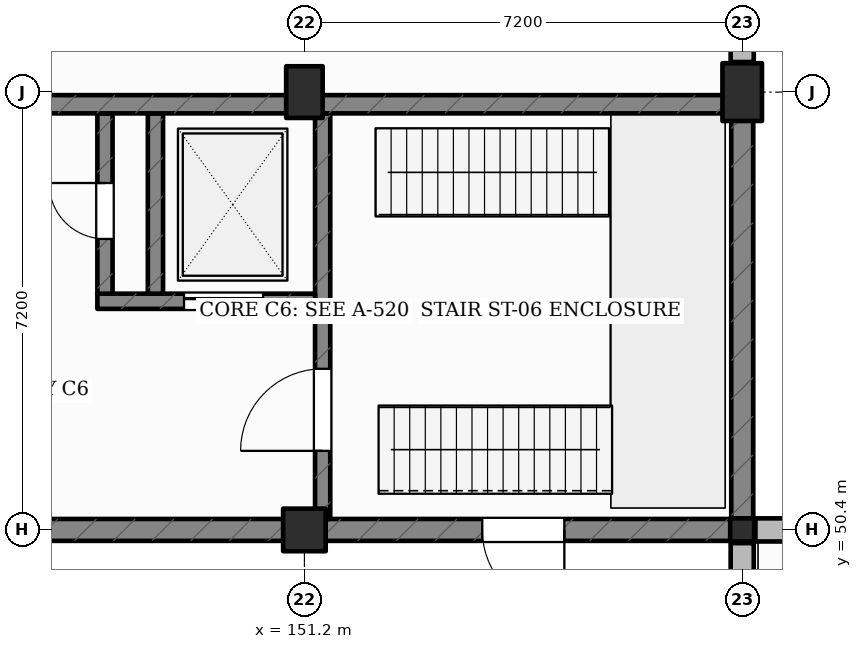
"""IFC4 building model, lengths in metres.
Left out: names, types, materials, properties, quantities, classifications, styles, units other than length and angle.
Written with IfcOpenShell. Run it as: python <this file> out.ifc"""

import sys

from ifc_helpers import new_model, si_unit, direction, frame, frame_2d, origin, origin_2d, place, context, subcontext, project, spatial, rectangle, i_section, extrude, element, fill, save


model = new_model("IFC4")
c1 = context("Model", 3, precision=1e-05, world=origin(), true_north=direction((0.0, 1.0)))
c2 = subcontext(c1, "Body", "Model", "MODEL_VIEW")
j1 = project(units=[si_unit("LENGTHUNIT", "METRE"), si_unit("PLANEANGLEUNIT", "RADIAN")], contexts=[c1])
p1 = place(None, origin())
s1 = spatial("IfcSite", under=j1, at=p1, CompositionType="ELEMENT")
p2 = place(p1, origin())
s2 = spatial("IfcBuilding", under=s1, at=p2, CompositionType="ELEMENT")
p3 = place(p2, origin())
s3 = spatial("IfcBuildingStorey", under=s2, at=p3, CompositionType="ELEMENT", Elevation=0.0)
p4 = place(p3, frame((151.2, 50.4, -0.3), z_axis=(0.0, 0.0, 1.0), x_axis=(1.0, 0.0, 0.0)))
e1 = element("IfcColumn", 1, at=p4, inside=s3, PredefinedType="COLUMN", context=c2, shape_type="SweptSolid", body=[
    extrude(rectangle(XDim=0.7, YDim=0.7, at=origin_2d()), origin(), (0.0, 0.0, 1.0), 5.7),
])
p5 = place(p3, frame((151.2, 57.6, -0.3), z_axis=(0.0, 0.0, 1.0), x_axis=(1.0, 0.0, 0.0)))
e2 = element("IfcColumn", 2, at=p5, inside=s3, PredefinedType="COLUMN", context=c2, shape_type="SweptSolid", body=[
    extrude(rectangle(XDim=0.6, YDim=0.85, at=origin_2d()), origin(), (0.0, 0.0, 1.0), 5.7),
])
p6 = place(p3, frame((158.4, 50.4, -0.3), z_axis=(0.0, 0.0, 1.0), x_axis=(1.0, 0.0, 0.0)))
e3 = element("IfcColumn", 3, at=p6, inside=s3, PredefinedType="COLUMN", context=c2, shape_type="SweptSolid", body=[
    extrude(i_section(OverallWidth=0.395, OverallDepth=0.381, WebThickness=0.018, FlangeThickness=0.03, FilletRadius=0.015, at=origin_2d()), origin(), (0.0, 0.0, 1.0), 5.7),
])
p7 = place(p3, frame((158.4, 57.6, -0.3), z_axis=(0.0, 0.0, 1.0), x_axis=(1.0, 0.0, 0.0)))
e4 = element("IfcColumn", 4, at=p7, inside=s3, PredefinedType="COLUMN", context=c2, shape_type="SweptSolid", body=[
    extrude(rectangle(XDim=0.65, YDim=0.95, at=origin_2d()), origin(), (0.0, 0.0, 1.0), 5.7),
])
p8 = place(p3, frame((158.4, 64.642, 0.0), z_axis=(0.0, 0.0, 1.0), x_axis=(0.0, -1.0, 0.0)))
e5 = element("IfcWall", 5, at=p8, inside=s3, PredefinedType="SOLIDWALL", context=c2, shape_type="SweptSolid", body=[
    extrude(rectangle(XDim=6.547, YDim=0.38, at=frame_2d((3.273, 0.0))), origin(), (0.0, 0.0, 1.0), 4.523),
])
p9 = place(p8, frame((1.423, 0.0, 0.0)))
e6 = element("IfcOpeningElement", 6, at=p9, cuts=e5, PredefinedType="OPENING", context=c2, shape_type="SweptSolid", body=[
    extrude(rectangle(XDim=3.7, YDim=4.4, at=frame_2d((1.85, 2.2))), frame((0.0, 0.2, 0.0), z_axis=(0.0, -1.0, 0.0), x_axis=(1.0, 0.0, 0.0)), (0.0, 0.0, 1.0), 0.4),
])
p10 = place(p3, frame((158.4, 57.6, 0.0), z_axis=(0.0, 0.0, 1.0), x_axis=(0.0, -1.0, 0.0)))
e7 = element("IfcWall", 7, at=p10, inside=s3, PredefinedType="SHEAR", context=c2, shape_type="SweptSolid", body=[
    extrude(rectangle(XDim=7.2, YDim=0.36, at=frame_2d((3.6, 0.0))), origin(), (0.0, 0.0, 1.0), 4.373),
])
p11 = place(p3, frame((158.4, 50.4, 0.0), z_axis=(0.0, 0.0, 1.0), x_axis=(-1.0, 0.0, 0.0)))
e8 = element("IfcWall", 8, at=p11, inside=s3, PredefinedType="SHEAR", context=c2, shape_type="SweptSolid", body=[
    extrude(rectangle(XDim=7.2, YDim=0.36, at=frame_2d((3.6, 0.0))), origin(), (0.0, 0.0, 1.0), 4.373),
])
p12 = place(p11, frame((2.925, 0.0, 0.0)))
e9 = element("IfcOpeningElement", 9, at=p12, cuts=e8, PredefinedType="OPENING", context=c2, shape_type="SweptSolid", body=[
    extrude(rectangle(XDim=1.35, YDim=2.15, at=frame_2d((0.675, 1.075))), frame((0.0, 0.19, 0.0), z_axis=(0.0, -1.0, 0.0), x_axis=(1.0, 0.0, 0.0)), (0.0, 0.0, 1.0), 0.38),
])
p13 = place(p3, frame((151.2, 50.4, 0.0), z_axis=(0.0, 0.0, 1.0), x_axis=(-1.0, 0.0, 0.0)))
e10 = element("IfcWall", 10, at=p13, inside=s3, PredefinedType="SHEAR", context=c2, shape_type="SweptSolid", body=[
    extrude(rectangle(XDim=7.2, YDim=0.36, at=frame_2d((3.6, 0.0))), origin(), (0.0, 0.0, 1.0), 4.6),
])
p14 = place(p3, frame((158.617, 50.4, 0.0), z_axis=(0.0, 0.0, 1.0), x_axis=(1.0, 0.0, 0.0)))
e11 = element("IfcWall", 11, at=p14, inside=s3, PredefinedType="SOLIDWALL", context=c2, shape_type="SweptSolid", body=[
    extrude(rectangle(XDim=6.765, YDim=0.38, at=frame_2d((3.383, 0.0))), origin(), (0.0, 0.0, 1.0), 4.373),
])
p15 = place(p3, frame((158.4, 43.417, 0.0), z_axis=(0.0, 0.0, 1.0), x_axis=(0.0, 1.0, 0.0)))
e12 = element("IfcWall", 12, at=p15, inside=s3, PredefinedType="SOLIDWALL", context=c2, shape_type="SweptSolid", body=[
    extrude(rectangle(XDim=6.765, YDim=0.38, at=frame_2d((3.383, 0.0))), origin(), (0.0, 0.0, 1.0), 4.373),
])
p16 = place(p15, frame((2.633, 0.0, 0.0)))
e13 = element("IfcOpeningElement", 13, at=p16, cuts=e12, PredefinedType="OPENING", context=c2, shape_type="SweptSolid", body=[
    extrude(rectangle(XDim=1.5, YDim=2.15, at=frame_2d((0.75, 1.075))), frame((0.0, 0.2, 0.0), z_axis=(0.0, -1.0, 0.0), x_axis=(1.0, 0.0, 0.0)), (0.0, 0.0, 1.0), 0.4),
])
p17 = place(p3, frame((151.5, 50.58, 0.0), z_axis=(0.0, 0.0, 1.0), x_axis=(0.0, 1.0, 0.0)))
e14 = element("IfcWall", 14, at=p17, inside=s3, PredefinedType="SHEAR", context=c2, shape_type="SweptSolid", body=[
    extrude(rectangle(XDim=6.67, YDim=0.25, at=frame_2d((3.335, 0.0))), origin(), (0.0, 0.0, 1.0), 4.45),
])
p18 = place(p17, frame((1.12, 0.0, 0.0)))
e15 = element("IfcOpeningElement", 15, at=p18, cuts=e14, PredefinedType="OPENING", context=c2, shape_type="SweptSolid", body=[
    extrude(rectangle(XDim=1.35, YDim=2.15, at=frame_2d((0.675, 1.075))), frame((0.0, 0.135, 0.0), z_axis=(0.0, -1.0, 0.0), x_axis=(1.0, 0.0, 0.0)), (0.0, 0.0, 1.0), 0.27),
])
p19 = place(p3, frame((147.795, 54.16, 0.0), z_axis=(0.0, 0.0, 1.0), x_axis=(1.0, 0.0, 0.0)))
e16 = element("IfcWall", 16, at=p19, inside=s3, PredefinedType="SHEAR", context=c2, shape_type="SweptSolid", body=[
    extrude(rectangle(XDim=3.58, YDim=0.25, at=frame_2d((1.79, 0.0))), origin(), (0.0, 0.0, 1.0), 4.45),
])
p20 = place(p19, frame((1.425, 0.0, 0.0)))
e17 = element("IfcOpeningElement", 17, at=p20, cuts=e16, PredefinedType="OPENING", context=c2, shape_type="SweptSolid", body=[
    extrude(rectangle(XDim=1.3, YDim=2.2, at=frame_2d((0.65, 1.1))), frame((0.0, 0.135, 0.0), z_axis=(0.0, -1.0, 0.0), x_axis=(1.0, 0.0, 0.0)), (0.0, 0.0, 1.0), 0.27),
])
p21 = place(p3, frame((148.75, 54.285, 0.0), z_axis=(0.0, 0.0, 1.0), x_axis=(0.0, 1.0, 0.0)))
e18 = element("IfcWall", 18, at=p21, inside=s3, PredefinedType="SHEAR", context=c2, shape_type="SweptSolid", body=[
    extrude(rectangle(XDim=2.965, YDim=0.25, at=frame_2d((1.482, 0.0))), origin(), (0.0, 0.0, 1.0), 4.45),
])
p22 = place(p3, frame((147.92, 54.285, 0.0), z_axis=(0.0, 0.0, 1.0), x_axis=(0.0, 1.0, 0.0)))
e19 = element("IfcWall", 19, at=p22, inside=s3, PredefinedType="SHEAR", context=c2, shape_type="SweptSolid", body=[
    extrude(rectangle(XDim=2.965, YDim=0.25, at=frame_2d((1.482, 0.0))), origin(), (0.0, 0.0, 1.0), 4.45),
])
p23 = place(p22, frame((0.9, 0.0, 0.0)))
e20 = element("IfcOpeningElement", 20, at=p23, cuts=e19, PredefinedType="OPENING", context=c2, shape_type="SweptSolid", body=[
    extrude(rectangle(XDim=0.92, YDim=2.05, at=frame_2d((0.46, 1.025))), frame((0.0, 0.135, 0.0), z_axis=(0.0, -1.0, 0.0), x_axis=(1.0, 0.0, 0.0)), (0.0, 0.0, 1.0), 0.27),
])
p24 = place(p3, frame((144.0, 57.4, 0.0), z_axis=(0.0, 0.0, 1.0), x_axis=(1.0, 0.0, 0.0)))
e21 = element("IfcWall", 21, at=p24, inside=s3, PredefinedType="SHEAR", context=c2, shape_type="SweptSolid", body=[
    extrude(rectangle(XDim=14.23, YDim=0.3, at=frame_2d((7.115, 0.0))), origin(), (0.0, 0.0, 1.0), 4.45),
])
p25 = place(p12, origin())
e22 = element("IfcDoor", 22, at=p25, inside=s3, OperationType="SINGLE_SWING_LEFT", PredefinedType="DOOR", context=c2, shape_type="SweptSolid", body=[
    extrude(rectangle(XDim=1.35, YDim=2.15, at=frame_2d((0.675, 1.075))), frame((0.0, 0.025, 0.0), z_axis=(0.0, -1.0, 0.0), x_axis=(1.0, 0.0, 0.0)), (0.0, 0.0, 1.0), 0.05),
])
fill(e9, e22)
p26 = place(p18, origin())
e23 = element("IfcDoor", 23, at=p26, inside=s3, OperationType="SINGLE_SWING_LEFT", PredefinedType="DOOR", context=c2, shape_type="SweptSolid", body=[
    extrude(rectangle(XDim=1.35, YDim=2.15, at=frame_2d((0.675, 1.075))), frame((0.0, 0.025, 0.0), z_axis=(0.0, -1.0, 0.0), x_axis=(1.0, 0.0, 0.0)), (0.0, 0.0, 1.0), 0.05),
])
fill(e15, e23)
p27 = place(p20, origin())
e24 = element("IfcDoor", 24, at=p27, inside=s3, OperationType="SLIDING_TO_LEFT", PredefinedType="DOOR", context=c2, shape_type="SweptSolid", body=[
    extrude(rectangle(XDim=1.3, YDim=2.2, at=frame_2d((0.65, 1.1))), frame((0.0, 0.025, 0.0), z_axis=(0.0, -1.0, 0.0), x_axis=(1.0, 0.0, 0.0)), (0.0, 0.0, 1.0), 0.05),
])
fill(e17, e24)
p28 = place(p23, origin())
e25 = element("IfcDoor", 25, at=p28, inside=s3, OperationType="SINGLE_SWING_RIGHT", PredefinedType="DOOR", context=c2, shape_type="SweptSolid", body=[
    extrude(rectangle(XDim=0.92, YDim=2.05, at=frame_2d((0.46, 1.025))), frame((0.0, 0.025, 0.0), z_axis=(0.0, -1.0, 0.0), x_axis=(1.0, 0.0, 0.0)), (0.0, 0.0, 1.0), 0.05),
])
fill(e20, e25)
save(model, sys.argv[1])
